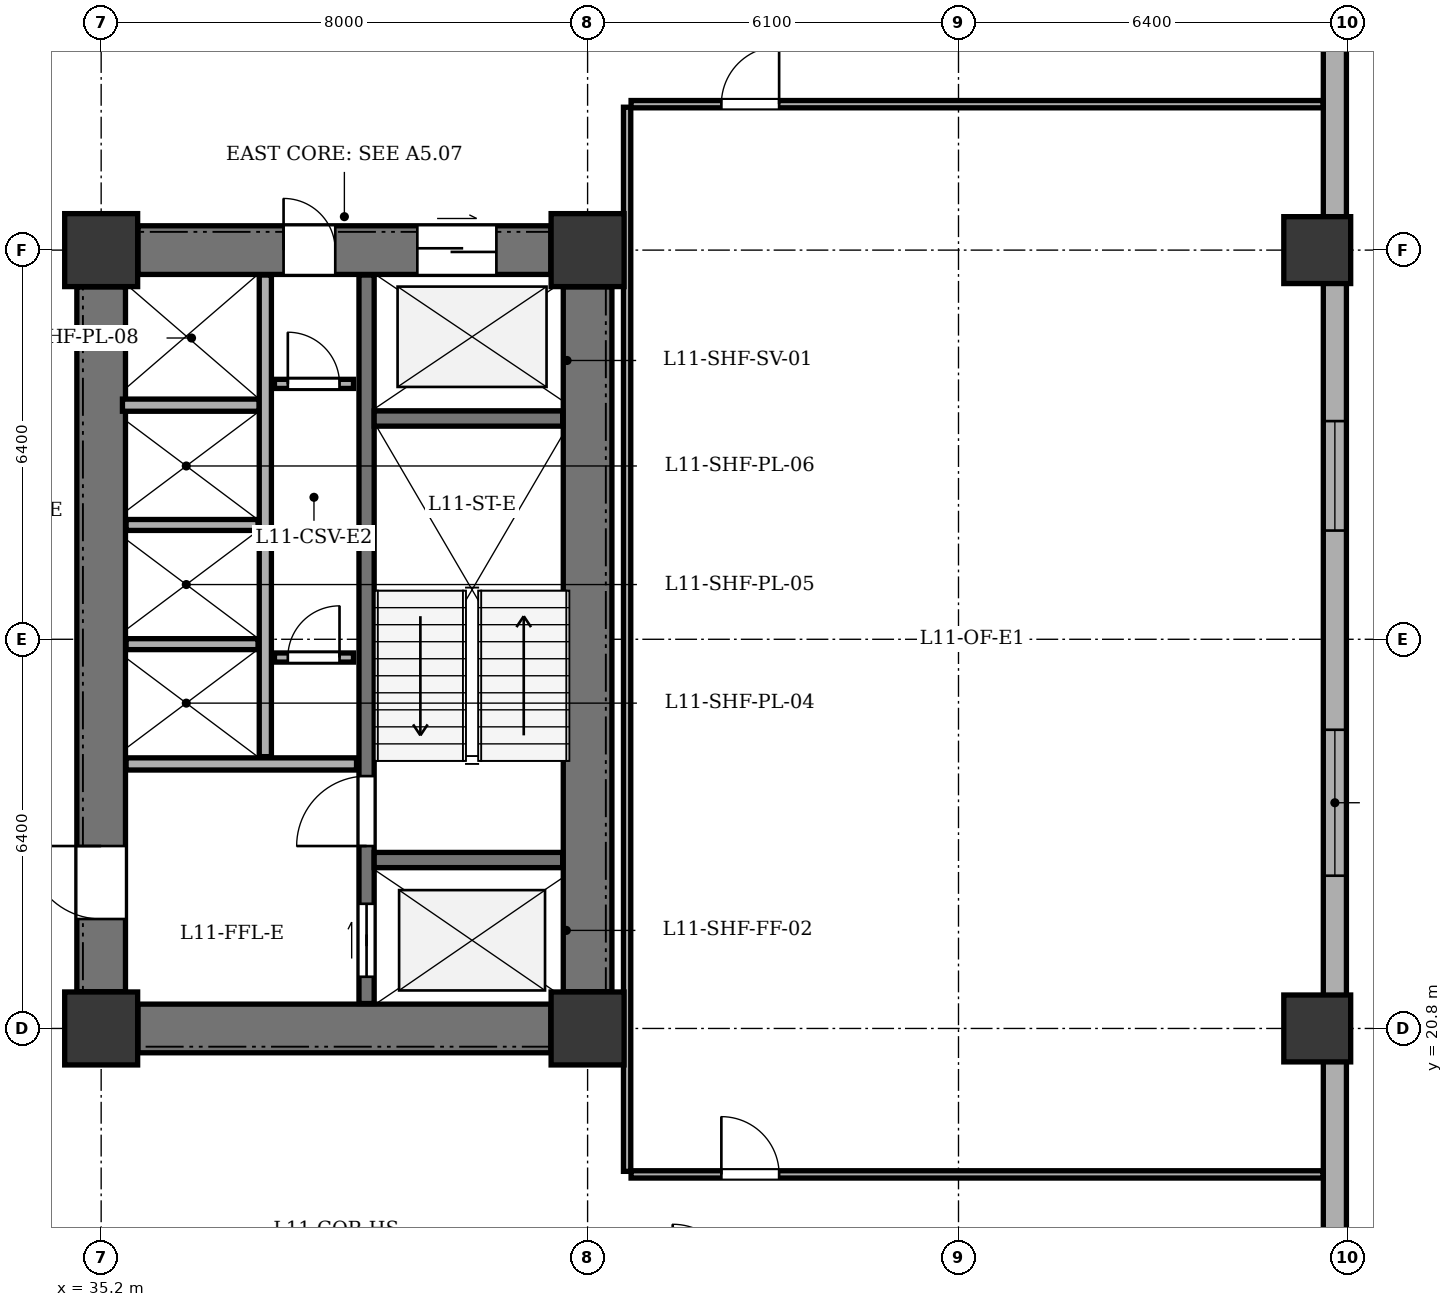
"""IFC4 building model, lengths in metres.
Left out: names, types, materials, properties, quantities, classifications, styles, units other than length and angle.
Written with IfcOpenShell. Run it as: python <this file> out.ifc"""

import sys

from ifc_helpers import new_model, si_unit, direction, frame, frame_2d, origin, origin_2d, place, context, subcontext, project, spatial, rectangle, extrude, element, fill, save


model = new_model("IFC4")
c1 = context("Model", 3, precision=1e-05, world=origin(), true_north=direction((0.0, 1.0)))
c2 = subcontext(c1, "Body", "Model", "MODEL_VIEW")
j1 = project(units=[si_unit("LENGTHUNIT", "METRE"), si_unit("PLANEANGLEUNIT", "RADIAN")], contexts=[c1])
p1 = place(None, origin())
s1 = spatial("IfcSite", under=j1, at=p1, CompositionType="ELEMENT")
p2 = place(p1, origin())
s2 = spatial("IfcBuilding", under=s1, at=p2, CompositionType="ELEMENT")
p3 = place(p2, frame((0.0, 0.0, 47.7)))
s3 = spatial("IfcBuildingStorey", under=s2, at=p3, CompositionType="ELEMENT", Elevation=47.7)
for number, where, z_axis, x_axis in (
    (1, (35.2, 20.8, 0.0), (0.0, 0.0, 1.0), (1.0, 0.0, 0.0)),
    (2, (43.2, 20.8, 0.0), (0.0, 0.0, 1.0), (1.0, 0.0, 0.0)),
    (3, (35.2, 33.6, 0.0), (0.0, 0.0, 1.0), (1.0, 0.0, 0.0)),
    (4, (43.2, 33.6, 0.0), (0.0, 0.0, 1.0), (1.0, 0.0, 0.0)),
):
    element("IfcColumn", number, at=place(p3, frame(where, z_axis=z_axis, x_axis=x_axis)), inside=s3, PredefinedType="COLUMN", context=c2, shape_type="SweptSolid", body=[
        extrude(rectangle(XDim=1.2, YDim=1.2, at=origin_2d()), origin(), (0.0, 0.0, 1.0), 3.9),
    ])
for number, where, z_axis, x_axis in (
    (5, (55.2, 20.8, 0.0), (0.0, 0.0, 1.0), (1.0, 0.0, 0.0)),
    (6, (55.2, 33.6, 0.0), (0.0, 0.0, 1.0), (1.0, 0.0, 0.0)),
):
    element("IfcColumn", number, at=place(p3, frame(where, z_axis=z_axis, x_axis=x_axis)), inside=s3, PredefinedType="COLUMN", context=c2, shape_type="SweptSolid", body=[
        extrude(rectangle(XDim=1.1, YDim=1.1, at=origin_2d()), origin(), (0.0, 0.0, 1.0), 3.9),
    ])
p4 = place(p3, frame((55.49, 41.5, 0.0), z_axis=(0.0, 0.0, 1.0), x_axis=(0.0, -1.0, 0.0)))
e7 = element("IfcWall", 7, at=p4, inside=s3, PredefinedType="STANDARD", context=c2, shape_type="SweptSolid", body=[
    extrude(rectangle(XDim=35.0, YDim=0.38, at=frame_2d((17.5, 0.0))), origin(), (0.0, 0.0, 1.0), 3.135),
])
p5 = place(p4, frame((2.025, 0.0, 0.8)))
e8 = element("IfcOpeningElement", 8, at=p5, cuts=e7, PredefinedType="OPENING", context=c2, shape_type="SweptSolid", body=[
    extrude(rectangle(XDim=1.8, YDim=1.9, at=frame_2d((0.9, 0.95))), frame((0.0, 0.2, 0.0), z_axis=(0.0, -1.0, 0.0), x_axis=(1.0, 0.0, 0.0)), (0.0, 0.0, 1.0), 0.4),
])
p6 = place(p4, frame((10.712, 0.0, 0.8)))
e9 = element("IfcOpeningElement", 9, at=p6, cuts=e7, PredefinedType="OPENING", context=c2, shape_type="SweptSolid", body=[
    extrude(rectangle(XDim=1.8, YDim=1.9, at=frame_2d((0.9, 0.95))), frame((0.0, 0.2, 0.0), z_axis=(0.0, -1.0, 0.0), x_axis=(1.0, 0.0, 0.0)), (0.0, 0.0, 1.0), 0.4),
])
p7 = place(p4, frame((15.788, 0.0, 0.8)))
e10 = element("IfcOpeningElement", 10, at=p7, cuts=e7, PredefinedType="OPENING", context=c2, shape_type="SweptSolid", body=[
    extrude(rectangle(XDim=2.4, YDim=1.9, at=frame_2d((1.2, 0.95))), frame((0.0, 0.2, 0.0), z_axis=(0.0, -1.0, 0.0), x_axis=(1.0, 0.0, 0.0)), (0.0, 0.0, 1.0), 0.4),
])
p8 = place(p4, frame((25.443, 0.0, 0.8)))
e11 = element("IfcOpeningElement", 11, at=p8, cuts=e7, PredefinedType="OPENING", context=c2, shape_type="SweptSolid", body=[
    extrude(rectangle(XDim=1.8, YDim=1.9, at=frame_2d((0.9, 0.95))), frame((0.0, 0.2, 0.0), z_axis=(0.0, -1.0, 0.0), x_axis=(1.0, 0.0, 0.0)), (0.0, 0.0, 1.0), 0.4),
])
p9 = place(p4, frame((30.207, 0.0, 0.8)))
e12 = element("IfcOpeningElement", 12, at=p9, cuts=e7, PredefinedType="OPENING", context=c2, shape_type="SweptSolid", body=[
    extrude(rectangle(XDim=2.4, YDim=1.9, at=frame_2d((1.2, 0.95))), frame((0.0, 0.2, 0.0), z_axis=(0.0, -1.0, 0.0), x_axis=(1.0, 0.0, 0.0)), (0.0, 0.0, 1.0), 0.4),
])
p10 = place(p3, frame((43.2, 21.405, 0.0), z_axis=(0.0, 0.0, 1.0), x_axis=(0.0, 1.0, 0.0)))
e13 = element("IfcWall", 13, at=p10, inside=s3, PredefinedType="SHEAR", context=c2, shape_type="SweptSolid", body=[
    extrude(rectangle(XDim=11.59, YDim=0.8, at=frame_2d((5.795, 0.0))), origin(), (0.0, 0.0, 1.0), 3.6),
])
p11 = place(p3, frame((35.805, 20.8, 0.0), z_axis=(0.0, 0.0, 1.0), x_axis=(1.0, 0.0, 0.0)))
e14 = element("IfcWall", 14, at=p11, inside=s3, PredefinedType="SHEAR", context=c2, shape_type="SweptSolid", body=[
    extrude(rectangle(XDim=6.79, YDim=0.8, at=frame_2d((3.395, 0.0))), origin(), (0.0, 0.0, 1.0), 3.6),
])
p12 = place(p3, frame((35.805, 33.6, 0.0), z_axis=(0.0, 0.0, 1.0), x_axis=(1.0, 0.0, 0.0)))
e15 = element("IfcWall", 15, at=p12, inside=s3, PredefinedType="SHEAR", context=c2, shape_type="SweptSolid", body=[
    extrude(rectangle(XDim=6.79, YDim=0.8, at=frame_2d((3.395, 0.0))), origin(), (0.0, 0.0, 1.0), 3.6),
])
p13 = place(p12, frame((4.595, 0.0, 0.0)))
e16 = element("IfcOpeningElement", 16, at=p13, cuts=e15, PredefinedType="OPENING", context=c2, shape_type="SweptSolid", body=[
    extrude(rectangle(XDim=1.3, YDim=2.15, at=frame_2d((0.65, 1.075))), frame((0.0, 0.41, 0.0), z_axis=(0.0, -1.0, 0.0), x_axis=(1.0, 0.0, 0.0)), (0.0, 0.0, 1.0), 0.82),
])
p14 = place(p12, frame((2.395, 0.0, 0.0)))
e17 = element("IfcOpeningElement", 17, at=p14, cuts=e15, PredefinedType="OPENING", context=c2, shape_type="SweptSolid", body=[
    extrude(rectangle(XDim=0.85, YDim=2.02, at=frame_2d((0.425, 1.01))), frame((0.0, 0.41, 0.0), z_axis=(0.0, -1.0, 0.0), x_axis=(1.0, 0.0, 0.0)), (0.0, 0.0, 1.0), 0.82),
])
p15 = place(p3, frame((35.2, 21.405, 0.0), z_axis=(0.0, 0.0, 1.0), x_axis=(0.0, 1.0, 0.0)))
e18 = element("IfcWall", 18, at=p15, inside=s3, PredefinedType="SHEAR", context=c2, shape_type="SweptSolid", body=[
    extrude(rectangle(XDim=11.59, YDim=0.8, at=frame_2d((5.795, 0.0))), origin(), (0.0, 0.0, 1.0), 3.6),
])
p16 = place(p15, frame((1.195, 0.0, 0.0)))
e19 = element("IfcOpeningElement", 19, at=p16, cuts=e18, PredefinedType="OPENING", context=c2, shape_type="SweptSolid", body=[
    extrude(rectangle(XDim=1.2, YDim=2.15, at=frame_2d((0.6, 1.075))), frame((0.0, 0.41, 0.0), z_axis=(0.0, -1.0, 0.0), x_axis=(1.0, 0.0, 0.0)), (0.0, 0.0, 1.0), 0.82),
])
p17 = place(p3, frame((39.565, 21.21, 0.0), z_axis=(0.0, 0.0, 1.0), x_axis=(0.0, 1.0, 0.0)))
e20 = element("IfcWall", 20, at=p17, inside=s3, PredefinedType="SHEAR", context=c2, shape_type="SweptSolid", body=[
    extrude(rectangle(XDim=11.98, YDim=0.25, at=frame_2d((5.99, 0.0))), origin(), (0.0, 0.0, 1.0), 3.6),
])
p18 = place(p17, frame((0.44, 0.0, 0.0)))
e21 = element("IfcOpeningElement", 21, at=p18, cuts=e20, PredefinedType="OPENING", context=c2, shape_type="SweptSolid", body=[
    extrude(rectangle(XDim=1.2, YDim=2.15, at=frame_2d((0.6, 1.075))), frame((0.0, 0.135, 0.0), z_axis=(0.0, -1.0, 0.0), x_axis=(1.0, 0.0, 0.0)), (0.0, 0.0, 1.0), 0.27),
])
p19 = place(p17, frame((2.59, 0.0, 0.0)))
e22 = element("IfcOpeningElement", 22, at=p19, cuts=e20, PredefinedType="OPENING", context=c2, shape_type="SweptSolid", body=[
    extrude(rectangle(XDim=1.15, YDim=2.15, at=frame_2d((0.575, 1.075))), frame((0.0, 0.135, 0.0), z_axis=(0.0, -1.0, 0.0), x_axis=(1.0, 0.0, 0.0)), (0.0, 0.0, 1.0), 0.27),
])
for number, where, z_axis, x_axis in (
    (23, (39.69, 23.57, 0.0), (0.0, 0.0, 1.0), (1.0, 0.0, 0.0)),
    (24, (39.69, 30.83, 0.0), (0.0, 0.0, 1.0), (1.0, 0.0, 0.0)),
):
    element("IfcWall", number, at=place(p3, frame(where, z_axis=z_axis, x_axis=x_axis)), inside=s3, PredefinedType="SHEAR", context=c2, shape_type="SweptSolid", body=[
        extrude(rectangle(XDim=3.1, YDim=0.25, at=frame_2d((1.55, 0.0))), origin(), (0.0, 0.0, 1.0), 3.6),
    ])
p20 = place(p3, frame((35.61, 25.15, 0.0), z_axis=(0.0, 0.0, 1.0), x_axis=(1.0, 0.0, 0.0)))
e25 = element("IfcWall", 25, at=p20, inside=s3, PredefinedType="SOLIDWALL", context=c2, shape_type="SweptSolid", body=[
    extrude(rectangle(XDim=3.79, YDim=0.2, at=frame_2d((1.895, 0.0))), origin(), (0.0, 0.0, 1.0), 3.6),
])
p21 = place(p3, frame((35.55, 31.05, 0.0), z_axis=(0.0, 0.0, 1.0), x_axis=(1.0, 0.0, 0.0)))
e26 = element("IfcWall", 26, at=p21, inside=s3, PredefinedType="SOLIDWALL", context=c2, shape_type="SweptSolid", body=[
    extrude(rectangle(XDim=2.25, YDim=0.2, at=frame_2d((1.125, 0.0))), origin(), (0.0, 0.0, 1.0), 3.6),
])
p22 = place(p3, frame((37.9, 25.27, 0.0), z_axis=(0.0, 0.0, 1.0), x_axis=(0.0, 1.0, 0.0)))
e27 = element("IfcWall", 27, at=p22, inside=s3, PredefinedType="SOLIDWALL", context=c2, shape_type="SweptSolid", body=[
    extrude(rectangle(XDim=7.92, YDim=0.2, at=frame_2d((3.96, 0.0))), origin(), (0.0, 0.0, 1.0), 3.6),
])
for number, where, z_axis, x_axis in (
    (28, (35.61, 27.12, 0.0), (0.0, 0.0, 1.0), (1.0, 0.0, 0.0)),
    (29, (35.61, 29.08, 0.0), (0.0, 0.0, 1.0), (1.0, 0.0, 0.0)),
):
    element("IfcWall", number, at=place(p3, frame(where, z_axis=z_axis, x_axis=x_axis)), inside=s3, PredefinedType="PARTITIONING", context=c2, shape_type="SweptSolid", body=[
        extrude(rectangle(XDim=2.17, YDim=0.18, at=frame_2d((1.085, 0.0))), origin(), (0.0, 0.0, 1.0), 3.6),
    ])
p23 = place(p3, frame((38.05, 26.9, 0.0), z_axis=(0.0, 0.0, 1.0), x_axis=(1.0, 0.0, 0.0)))
e30 = element("IfcWall", 30, at=p23, inside=s3, PredefinedType="PARTITIONING", context=c2, shape_type="SweptSolid", body=[
    extrude(rectangle(XDim=1.3, YDim=0.15, at=frame_2d((0.65, 0.0))), origin(), (0.0, 0.0, 1.0), 3.6),
])
p24 = place(p23, frame((0.22, 0.0, 0.0)))
e31 = element("IfcOpeningElement", 31, at=p24, cuts=e30, PredefinedType="OPENING", context=c2, shape_type="SweptSolid", body=[
    extrude(rectangle(XDim=0.85, YDim=2.02, at=frame_2d((0.425, 1.01))), frame((0.0, 0.085, 0.0), z_axis=(0.0, -1.0, 0.0), x_axis=(1.0, 0.0, 0.0)), (0.0, 0.0, 1.0), 0.17),
])
p25 = place(p3, frame((38.05, 31.4, 0.0), z_axis=(0.0, 0.0, 1.0), x_axis=(1.0, 0.0, 0.0)))
e32 = element("IfcWall", 32, at=p25, inside=s3, PredefinedType="PARTITIONING", context=c2, shape_type="SweptSolid", body=[
    extrude(rectangle(XDim=1.3, YDim=0.15, at=frame_2d((0.65, 0.0))), origin(), (0.0, 0.0, 1.0), 3.6),
])
p26 = place(p25, frame((0.22, 0.0, 0.0)))
e33 = element("IfcOpeningElement", 33, at=p26, cuts=e32, PredefinedType="OPENING", context=c2, shape_type="SweptSolid", body=[
    extrude(rectangle(XDim=0.85, YDim=2.02, at=frame_2d((0.425, 1.01))), frame((0.0, 0.085, 0.0), z_axis=(0.0, -1.0, 0.0), x_axis=(1.0, 0.0, 0.0)), (0.0, 0.0, 1.0), 0.17),
])
p27 = place(p3, frame((43.85, 18.45, 0.0), z_axis=(0.0, 0.0, 1.0), x_axis=(0.0, 1.0, 0.0)))
e34 = element("IfcWall", 34, at=p27, inside=s3, PredefinedType="PARTITIONING", context=c2, shape_type="SweptSolid", body=[
    extrude(rectangle(XDim=17.5, YDim=0.12, at=frame_2d((8.75, 0.0))), origin(), (0.0, 0.0, 1.0), 3.6),
])
p28 = place(p3, frame((43.915, 18.4, 0.0), z_axis=(0.0, 0.0, 1.0), x_axis=(1.0, 0.0, 0.0)))
e35 = element("IfcWall", 35, at=p28, inside=s3, PredefinedType="PARTITIONING", context=c2, shape_type="SweptSolid", body=[
    extrude(rectangle(XDim=11.38, YDim=0.12, at=frame_2d((5.69, 0.0))), origin(), (0.0, 0.0, 1.0), 3.6),
])
p29 = place(p28, frame((1.485, 0.0, 0.0)))
e36 = element("IfcOpeningElement", 36, at=p29, cuts=e35, PredefinedType="OPENING", context=c2, shape_type="SweptSolid", body=[
    extrude(rectangle(XDim=0.95, YDim=2.1, at=frame_2d((0.475, 1.05))), frame((0.0, 0.07, 0.0), z_axis=(0.0, -1.0, 0.0), x_axis=(1.0, 0.0, 0.0)), (0.0, 0.0, 1.0), 0.14),
])
p30 = place(p3, frame((43.915, 36.0, 0.0), z_axis=(0.0, 0.0, 1.0), x_axis=(1.0, 0.0, 0.0)))
e37 = element("IfcWall", 37, at=p30, inside=s3, PredefinedType="PARTITIONING", context=c2, shape_type="SweptSolid", body=[
    extrude(rectangle(XDim=11.38, YDim=0.12, at=frame_2d((5.69, 0.0))), origin(), (0.0, 0.0, 1.0), 3.6),
])
p31 = place(p30, frame((1.485, 0.0, 0.0)))
e38 = element("IfcOpeningElement", 38, at=p31, cuts=e37, PredefinedType="OPENING", context=c2, shape_type="SweptSolid", body=[
    extrude(rectangle(XDim=0.95, YDim=2.1, at=frame_2d((0.475, 1.05))), frame((0.0, 0.07, 0.0), z_axis=(0.0, -1.0, 0.0), x_axis=(1.0, 0.0, 0.0)), (0.0, 0.0, 1.0), 0.14),
])
p32 = place(p6, origin())
e39 = element("IfcWindow", 39, at=p32, inside=s3, PartitioningType="SINGLE_PANEL", PredefinedType="WINDOW", context=c2, shape_type="SweptSolid", body=[
    extrude(rectangle(XDim=1.8, YDim=1.9, at=frame_2d((0.9, 0.95))), frame((0.0, -0.01, 0.0), z_axis=(0.0, -1.0, 0.0), x_axis=(1.0, 0.0, 0.0)), (0.0, 0.0, 1.0), 0.06),
])
fill(e9, e39)
p33 = place(p7, origin())
e40 = element("IfcWindow", 40, at=p33, inside=s3, PartitioningType="SINGLE_PANEL", PredefinedType="WINDOW", context=c2, shape_type="SweptSolid", body=[
    extrude(rectangle(XDim=2.4, YDim=1.9, at=frame_2d((1.2, 0.95))), frame((0.0, -0.01, 0.0), z_axis=(0.0, -1.0, 0.0), x_axis=(1.0, 0.0, 0.0)), (0.0, 0.0, 1.0), 0.06),
])
fill(e10, e40)
p34 = place(p13, origin())
e41 = element("IfcDoor", 41, at=p34, inside=s3, OperationType="DOUBLE_DOOR_SLIDING", PredefinedType="DOOR", context=c2, shape_type="SweptSolid", body=[
    extrude(rectangle(XDim=1.3, YDim=2.15, at=frame_2d((0.65, 1.075))), frame((0.0, 0.025, 0.0), z_axis=(0.0, -1.0, 0.0), x_axis=(1.0, 0.0, 0.0)), (0.0, 0.0, 1.0), 0.05),
])
fill(e16, e41)
p35 = place(p14, origin())
e42 = element("IfcDoor", 42, at=p35, inside=s3, OperationType="SINGLE_SWING_LEFT", PredefinedType="DOOR", context=c2, shape_type="SweptSolid", body=[
    extrude(rectangle(XDim=0.85, YDim=2.02, at=frame_2d((0.425, 1.01))), frame((0.0, 0.025, 0.0), z_axis=(0.0, -1.0, 0.0), x_axis=(1.0, 0.0, 0.0)), (0.0, 0.0, 1.0), 0.05),
])
fill(e17, e42)
p36 = place(p16, origin())
e43 = element("IfcDoor", 43, at=p36, inside=s3, OperationType="SINGLE_SWING_RIGHT", PredefinedType="DOOR", context=c2, shape_type="SweptSolid", body=[
    extrude(rectangle(XDim=1.2, YDim=2.15, at=frame_2d((0.6, 1.075))), frame((0.0, 0.025, 0.0), z_axis=(0.0, -1.0, 0.0), x_axis=(1.0, 0.0, 0.0)), (0.0, 0.0, 1.0), 0.05),
])
fill(e19, e43)
p37 = place(p18, origin())
e44 = element("IfcDoor", 44, at=p37, inside=s3, OperationType="DOUBLE_DOOR_SLIDING", PredefinedType="DOOR", context=c2, shape_type="SweptSolid", body=[
    extrude(rectangle(XDim=1.2, YDim=2.15, at=frame_2d((0.6, 1.075))), frame((0.0, 0.025, 0.0), z_axis=(0.0, -1.0, 0.0), x_axis=(1.0, 0.0, 0.0)), (0.0, 0.0, 1.0), 0.05),
])
fill(e21, e44)
p38 = place(p19, origin())
e45 = element("IfcDoor", 45, at=p38, inside=s3, OperationType="SINGLE_SWING_LEFT", PredefinedType="DOOR", context=c2, shape_type="SweptSolid", body=[
    extrude(rectangle(XDim=1.15, YDim=2.15, at=frame_2d((0.575, 1.075))), frame((0.0, 0.025, 0.0), z_axis=(0.0, -1.0, 0.0), x_axis=(1.0, 0.0, 0.0)), (0.0, 0.0, 1.0), 0.05),
])
fill(e22, e45)
p39 = place(p24, origin())
e46 = element("IfcDoor", 46, at=p39, inside=s3, OperationType="SINGLE_SWING_RIGHT", PredefinedType="DOOR", context=c2, shape_type="SweptSolid", body=[
    extrude(rectangle(XDim=0.85, YDim=2.02, at=frame_2d((0.425, 1.01))), frame((0.0, 0.025, 0.0), z_axis=(0.0, -1.0, 0.0), x_axis=(1.0, 0.0, 0.0)), (0.0, 0.0, 1.0), 0.05),
])
fill(e31, e46)
p40 = place(p26, origin())
e47 = element("IfcDoor", 47, at=p40, inside=s3, OperationType="SINGLE_SWING_LEFT", PredefinedType="DOOR", context=c2, shape_type="SweptSolid", body=[
    extrude(rectangle(XDim=0.85, YDim=2.02, at=frame_2d((0.425, 1.01))), frame((0.0, 0.025, 0.0), z_axis=(0.0, -1.0, 0.0), x_axis=(1.0, 0.0, 0.0)), (0.0, 0.0, 1.0), 0.05),
])
fill(e33, e47)
p41 = place(p29, origin())
e48 = element("IfcDoor", 48, at=p41, inside=s3, OperationType="SINGLE_SWING_LEFT", PredefinedType="DOOR", context=c2, shape_type="SweptSolid", body=[
    extrude(rectangle(XDim=0.95, YDim=2.1, at=frame_2d((0.475, 1.05))), frame((0.0, 0.025, 0.0), z_axis=(0.0, -1.0, 0.0), x_axis=(1.0, 0.0, 0.0)), (0.0, 0.0, 1.0), 0.05),
])
fill(e36, e48)
p42 = place(p31, origin())
e49 = element("IfcDoor", 49, at=p42, inside=s3, OperationType="SINGLE_SWING_RIGHT", PredefinedType="DOOR", context=c2, shape_type="SweptSolid", body=[
    extrude(rectangle(XDim=0.95, YDim=2.1, at=frame_2d((0.475, 1.05))), frame((0.0, 0.025, 0.0), z_axis=(0.0, -1.0, 0.0), x_axis=(1.0, 0.0, 0.0)), (0.0, 0.0, 1.0), 0.05),
])
fill(e38, e49)
save(model, sys.argv[1])
